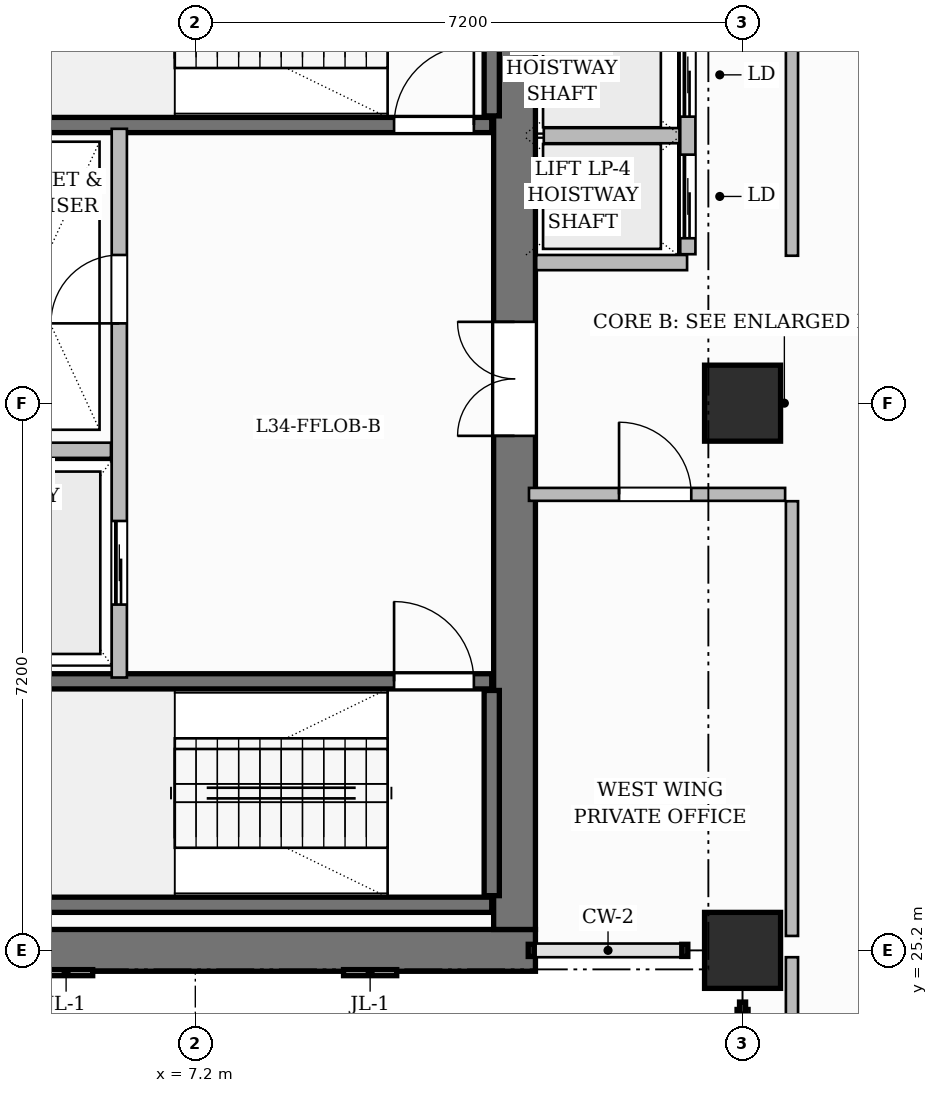
"""IFC4 building model, lengths in metres.
Left out: names, types, materials, properties, quantities, classifications, styles, units other than length and angle.
Written with IfcOpenShell. Run it as: python <this file> out.ifc"""

import sys

from ifc_helpers import new_model, si_unit, direction, frame, frame_2d, origin, origin_2d, place, context, subcontext, project, spatial, rectangle, extrude, source, transform, mapped, element, fill, save


model = new_model("IFC4")
c1 = context("Model", 3, precision=1e-05, world=origin(), true_north=direction((0.0, 1.0)))
c2 = subcontext(c1, "Body", "Model", "MODEL_VIEW")
j1 = project(units=[si_unit("LENGTHUNIT", "METRE"), si_unit("PLANEANGLEUNIT", "RADIAN")], contexts=[c1])
p1 = place(None, origin())
s1 = spatial("IfcSite", under=j1, at=p1, CompositionType="ELEMENT")
p2 = place(p1, origin())
s2 = spatial("IfcBuilding", under=s1, at=p2, CompositionType="ELEMENT")
p3 = place(p2, frame((0.0, 0.0, 137.7)))
s3 = spatial("IfcBuildingStorey", under=s2, at=p3, CompositionType="ELEMENT", Elevation=137.7)
p4 = place(p3, frame((3.325, 25.2, 0.0), z_axis=(0.0, 0.0, 1.0), x_axis=(1.0, 0.0, 0.0)))
e1 = element("IfcWall", 1, at=p4, inside=s3, PredefinedType="SHEAR", context=c2, shape_type="SweptSolid", body=[
    extrude(rectangle(XDim=8.35, YDim=0.55, at=frame_2d((4.175, 0.0))), origin(), (0.0, 0.0, 1.0), 3.7),
])
p5 = place(p3, frame((11.4, 25.475, 0.0), z_axis=(0.0, 0.0, 1.0), x_axis=(0.0, 1.0, 0.0)))
e2 = element("IfcWall", 2, at=p5, inside=s3, PredefinedType="SHEAR", context=c2, shape_type="SweptSolid", body=[
    extrude(rectangle(XDim=13.85, YDim=0.55, at=frame_2d((6.925, 0.0))), origin(), (0.0, 0.0, 1.0), 3.7),
])
p6 = place(p5, frame((6.495, 0.0, 0.0)))
e3 = element("IfcOpeningElement", 3, at=p6, cuts=e2, PredefinedType="OPENING", context=c2, shape_type="SweptSolid", body=[
    extrude(rectangle(XDim=1.5, YDim=2.2, at=frame_2d((0.75, 1.1))), frame((0.0, 0.285, 0.0), z_axis=(0.0, -1.0, 0.0), x_axis=(1.0, 0.0, 0.0)), (0.0, 0.0, 1.0), 0.57),
])
m1 = source(origin(), c2, "Body", "SweptSolid", [
    extrude(rectangle(XDim=1.0, YDim=1.0, at=origin_2d()), origin(), (0.0, 0.0, 1.0), 3.7),
])
for number, where, z_axis, x_axis in (
    (4, (14.4, 25.2, 0.0), (0.0, 0.0, 1.0), (1.0, 0.0, 0.0)),
    (5, (14.4, 32.4, 0.0), (0.0, 0.0, 1.0), (1.0, 0.0, 0.0)),
):
    element("IfcColumn", number, at=place(p3, frame(where, z_axis=z_axis, x_axis=x_axis)), inside=s3, PredefinedType="COLUMN", context=c2, shape_type="MappedRepresentation", body=[
        mapped(m1, transform((0.0, 0.0, 0.0), scale=1.0)),
    ])
p7 = place(p3, frame((4.0, 25.8, 0.0), z_axis=(0.0, 0.0, 1.0), x_axis=(1.0, 0.0, 0.0)))
e6 = element("IfcWall", 6, at=p7, inside=s3, PredefinedType="SHEAR", context=c2, shape_type="SweptSolid", body=[
    extrude(rectangle(XDim=7.1, YDim=0.2, at=frame_2d((3.55, 0.0))), origin(), (0.0, 0.0, 1.0), 3.7),
])
p8 = place(p3, frame((11.1, 25.92, 0.0), z_axis=(0.0, 0.0, 1.0), x_axis=(0.0, 1.0, 0.0)))
e7 = element("IfcWall", 7, at=p8, inside=s3, PredefinedType="SHEAR", context=c2, shape_type="SweptSolid", body=[
    extrude(rectangle(XDim=2.7, YDim=0.2, at=frame_2d((1.35, 0.0))), origin(), (0.0, 0.0, 1.0), 3.7),
])
p9 = place(p3, frame((4.0, 28.74, 0.0), z_axis=(0.0, 0.0, 1.0), x_axis=(1.0, 0.0, 0.0)))
e8 = element("IfcWall", 8, at=p9, inside=s3, PredefinedType="SHEAR", context=c2, shape_type="SweptSolid", body=[
    extrude(rectangle(XDim=7.1, YDim=0.2, at=frame_2d((3.55, 0.0))), origin(), (0.0, 0.0, 1.0), 3.7),
])
p10 = place(p9, frame((5.815, 0.0, 0.0)))
e9 = element("IfcOpeningElement", 9, at=p10, cuts=e8, PredefinedType="OPENING", context=c2, shape_type="SweptSolid", body=[
    extrude(rectangle(XDim=1.05, YDim=2.2, at=frame_2d((0.525, 1.1))), frame((0.0, 0.11, 0.0), z_axis=(0.0, -1.0, 0.0), x_axis=(1.0, 0.0, 0.0)), (0.0, 0.0, 1.0), 0.22),
])
p11 = place(p3, frame((11.1, 36.18, 0.0), z_axis=(0.0, 0.0, 1.0), x_axis=(0.0, 1.0, 0.0)))
e10 = element("IfcWall", 10, at=p11, inside=s3, PredefinedType="SHEAR", context=c2, shape_type="SweptSolid", body=[
    extrude(rectangle(XDim=2.7, YDim=0.2, at=frame_2d((1.35, 0.0))), origin(), (0.0, 0.0, 1.0), 3.7),
])
p12 = place(p3, frame((4.0, 36.06, 0.0), z_axis=(0.0, 0.0, 1.0), x_axis=(1.0, 0.0, 0.0)))
e11 = element("IfcWall", 11, at=p12, inside=s3, PredefinedType="SHEAR", context=c2, shape_type="SweptSolid", body=[
    extrude(rectangle(XDim=7.1, YDim=0.2, at=frame_2d((3.55, 0.0))), origin(), (0.0, 0.0, 1.0), 3.7),
])
p13 = place(p12, frame((5.815, 0.0, 0.0)))
e12 = element("IfcOpeningElement", 12, at=p13, cuts=e11, PredefinedType="OPENING", context=c2, shape_type="SweptSolid", body=[
    extrude(rectangle(XDim=1.05, YDim=2.2, at=frame_2d((0.525, 1.1))), frame((0.0, 0.11, 0.0), z_axis=(0.0, -1.0, 0.0), x_axis=(1.0, 0.0, 0.0)), (0.0, 0.0, 1.0), 0.22),
])
p14 = place(p3, frame((6.2, 28.79, 0.0), z_axis=(0.0, 0.0, 1.0), x_axis=(0.0, 1.0, 0.0)))
e13 = element("IfcWall", 13, at=p14, inside=s3, PredefinedType="PARTITIONING", context=c2, shape_type="SweptSolid", body=[
    extrude(rectangle(XDim=7.22, YDim=0.2, at=frame_2d((3.61, 0.0))), origin(), (0.0, 0.0, 1.0), 3.45),
])
p15 = place(p14, frame((4.66, 0.0, 0.0)))
e14 = element("IfcOpeningElement", 14, at=p15, cuts=e13, PredefinedType="OPENING", context=c2, shape_type="SweptSolid", body=[
    extrude(rectangle(XDim=0.9, YDim=2.1, at=frame_2d((0.45, 1.05))), frame((0.0, 0.11, 0.0), z_axis=(0.0, -1.0, 0.0), x_axis=(1.0, 0.0, 0.0)), (0.0, 0.0, 1.0), 0.22),
])
p16 = place(p14, frame((0.96, 0.0, 0.0)))
e15 = element("IfcOpeningElement", 15, at=p16, cuts=e13, PredefinedType="OPENING", context=c2, shape_type="SweptSolid", body=[
    extrude(rectangle(XDim=1.1, YDim=2.2, at=frame_2d((0.55, 1.1))), frame((0.0, 0.11, 0.0), z_axis=(0.0, -1.0, 0.0), x_axis=(1.0, 0.0, 0.0)), (0.0, 0.0, 1.0), 0.22),
])
p17 = place(p3, frame((3.96, 31.78, 0.0), z_axis=(0.0, 0.0, 1.0), x_axis=(1.0, 0.0, 0.0)))
e16 = element("IfcWall", 16, at=p17, inside=s3, PredefinedType="PARTITIONING", context=c2, shape_type="SweptSolid", body=[
    extrude(rectangle(XDim=2.13, YDim=0.2, at=frame_2d((1.065, 0.0))), origin(), (0.0, 0.0, 1.0), 3.45),
])
p18 = place(p3, frame((11.685, 34.25, 0.0), z_axis=(0.0, 0.0, 1.0), x_axis=(1.0, 0.0, 0.0)))
e17 = element("IfcWall", 17, at=p18, inside=s3, PredefinedType="PARTITIONING", context=c2, shape_type="SweptSolid", body=[
    extrude(rectangle(XDim=1.985, YDim=0.2, at=frame_2d((0.992, 0.0))), origin(), (0.0, 0.0, 1.0), 3.45),
])
p19 = place(p3, frame((13.68, 34.36, 0.0), z_axis=(0.0, 0.0, 1.0), x_axis=(0.0, 1.0, 0.0)))
e18 = element("IfcWall", 18, at=p19, inside=s3, PredefinedType="PARTITIONING", context=c2, shape_type="SweptSolid", body=[
    extrude(rectangle(XDim=4.72, YDim=0.2, at=frame_2d((2.36, 0.0))), origin(), (0.0, 0.0, 1.0), 3.45),
])
p20 = place(p19, frame((0.21, 0.0, 0.0)))
e19 = element("IfcOpeningElement", 19, at=p20, cuts=e18, PredefinedType="OPENING", context=c2, shape_type="SweptSolid", body=[
    extrude(rectangle(XDim=1.1, YDim=2.2, at=frame_2d((0.55, 1.1))), frame((0.0, 0.11, 0.0), z_axis=(0.0, -1.0, 0.0), x_axis=(1.0, 0.0, 0.0)), (0.0, 0.0, 1.0), 0.22),
])
p21 = place(p19, frame((1.81, 0.0, 0.0)))
e20 = element("IfcOpeningElement", 20, at=p21, cuts=e18, PredefinedType="OPENING", context=c2, shape_type="SweptSolid", body=[
    extrude(rectangle(XDim=1.1, YDim=2.2, at=frame_2d((0.55, 1.1))), frame((0.0, 0.11, 0.0), z_axis=(0.0, -1.0, 0.0), x_axis=(1.0, 0.0, 0.0)), (0.0, 0.0, 1.0), 0.22),
])
p22 = place(p19, frame((3.41, 0.0, 0.0)))
e21 = element("IfcOpeningElement", 21, at=p22, cuts=e18, PredefinedType="OPENING", context=c2, shape_type="SweptSolid", body=[
    extrude(rectangle(XDim=1.1, YDim=2.2, at=frame_2d((0.55, 1.1))), frame((0.0, 0.11, 0.0), z_axis=(0.0, -1.0, 0.0), x_axis=(1.0, 0.0, 0.0)), (0.0, 0.0, 1.0), 0.22),
])
p23 = place(p3, frame((11.785, 35.92, 0.0), z_axis=(0.0, 0.0, 1.0), x_axis=(1.0, 0.0, 0.0)))
e22 = element("IfcWall", 22, at=p23, inside=s3, PredefinedType="PARTITIONING", context=c2, shape_type="SweptSolid", body=[
    extrude(rectangle(XDim=1.785, YDim=0.2, at=frame_2d((0.893, 0.0))), origin(), (0.0, 0.0, 1.0), 3.45),
])
p24 = place(p3, frame((15.05, 12.16, 0.0), z_axis=(0.0, 0.0, 1.0), x_axis=(0.0, 1.0, 0.0)))
e23 = element("IfcWall", 23, at=p24, inside=s3, PredefinedType="PARTITIONING", context=c2, shape_type="SweptSolid", body=[
    extrude(rectangle(XDim=12.95, YDim=0.16, at=frame_2d((6.475, 0.0))), origin(), (0.0, 0.0, 1.0), 3.45),
])
p25 = place(p3, frame((15.05, 34.34, 0.0), z_axis=(0.0, 0.0, 1.0), x_axis=(0.0, 1.0, 0.0)))
e24 = element("IfcWall", 24, at=p25, inside=s3, PredefinedType="PARTITIONING", context=c2, shape_type="SweptSolid", body=[
    extrude(rectangle(XDim=5.22, YDim=0.16, at=frame_2d((2.61, 0.0))), origin(), (0.0, 0.0, 1.0), 3.45),
])
p26 = place(p3, frame((15.05, 25.39, 0.0), z_axis=(0.0, 0.0, 1.0), x_axis=(0.0, 1.0, 0.0)))
e25 = element("IfcWall", 25, at=p26, inside=s3, PredefinedType="PARTITIONING", context=c2, shape_type="SweptSolid", body=[
    extrude(rectangle(XDim=5.72, YDim=0.16, at=frame_2d((2.86, 0.0))), origin(), (0.0, 0.0, 1.0), 3.45),
])
p27 = place(p3, frame((11.59, 31.2, 0.0), z_axis=(0.0, 0.0, 1.0), x_axis=(1.0, 0.0, 0.0)))
e26 = element("IfcWall", 26, at=p27, inside=s3, PredefinedType="PARTITIONING", context=c2, shape_type="SweptSolid", body=[
    extrude(rectangle(XDim=3.37, YDim=0.17, at=frame_2d((1.685, 0.0))), origin(), (0.0, 0.0, 1.0), 3.45),
])
p28 = place(p27, frame((1.185, 0.0, 0.0)))
e27 = element("IfcOpeningElement", 27, at=p28, cuts=e26, PredefinedType="OPENING", context=c2, shape_type="SweptSolid", body=[
    extrude(rectangle(XDim=0.95, YDim=2.15, at=frame_2d((0.475, 1.075))), frame((0.0, 0.095, 0.0), z_axis=(0.0, -1.0, 0.0), x_axis=(1.0, 0.0, 0.0)), (0.0, 0.0, 1.0), 0.19),
])
m2 = source(origin(), c2, "Body", "SweptSolid", [
    extrude(rectangle(XDim=1.05, YDim=2.2, at=frame_2d((0.525, 1.1))), frame((0.0, 0.025, 0.0), z_axis=(0.0, -1.0, 0.0), x_axis=(1.0, 0.0, 0.0)), (0.0, 0.0, 1.0), 0.05),
])
p29 = place(p10, origin())
e28 = element("IfcDoor", 28, at=p29, inside=s3, OperationType="SINGLE_SWING_LEFT", PredefinedType="DOOR", context=c2, shape_type="MappedRepresentation", body=[
    mapped(m2, transform((0.0, 0.0, 0.0), scale=1.0)),
])
fill(e9, e28)
p30 = place(p13, origin())
e29 = element("IfcDoor", 29, at=p30, inside=s3, OperationType="SINGLE_SWING_RIGHT", PredefinedType="DOOR", context=c2, shape_type="MappedRepresentation", body=[
    mapped(m2, transform((0.0, 0.0, 0.0), scale=1.0)),
])
fill(e12, e29)
m3 = source(origin(), c2, "Body", "SweptSolid", [
    extrude(rectangle(XDim=0.9, YDim=2.1, at=frame_2d((0.45, 1.05))), frame((0.0, 0.025, 0.0), z_axis=(0.0, -1.0, 0.0), x_axis=(1.0, 0.0, 0.0)), (0.0, 0.0, 1.0), 0.05),
])
p31 = place(p15, origin())
e30 = element("IfcDoor", 30, at=p31, inside=s3, OperationType="SINGLE_SWING_LEFT", PredefinedType="DOOR", context=c2, shape_type="MappedRepresentation", body=[
    mapped(m3, transform((0.0, 0.0, 0.0), scale=1.0)),
])
fill(e14, e30)
m4 = source(origin(), c2, "Body", "SweptSolid", [
    extrude(rectangle(XDim=1.5, YDim=2.2, at=frame_2d((0.75, 1.1))), frame((0.0, 0.025, 0.0), z_axis=(0.0, -1.0, 0.0), x_axis=(1.0, 0.0, 0.0)), (0.0, 0.0, 1.0), 0.05),
])
p32 = place(p6, origin())
e31 = element("IfcDoor", 31, at=p32, inside=s3, OperationType="DOUBLE_DOOR_SINGLE_SWING", PredefinedType="DOOR", context=c2, shape_type="MappedRepresentation", body=[
    mapped(m4, transform((0.0, 0.0, 0.0), scale=1.0)),
])
fill(e3, e31)
m5 = source(origin(), c2, "Body", "SweptSolid", [
    extrude(rectangle(XDim=0.95, YDim=2.15, at=frame_2d((0.475, 1.075))), frame((0.0, 0.025, 0.0), z_axis=(0.0, -1.0, 0.0), x_axis=(1.0, 0.0, 0.0)), (0.0, 0.0, 1.0), 0.05),
])
p33 = place(p28, origin())
e32 = element("IfcDoor", 32, at=p33, inside=s3, OperationType="SINGLE_SWING_LEFT", PredefinedType="DOOR", context=c2, shape_type="MappedRepresentation", body=[
    mapped(m5, transform((0.0, 0.0, 0.0), scale=1.0)),
])
fill(e27, e32)
m6 = source(origin(), c2, "Body", "SweptSolid", [
    extrude(rectangle(XDim=1.1, YDim=2.2, at=frame_2d((0.55, 1.1))), frame((0.0, 0.025, 0.0), z_axis=(0.0, -1.0, 0.0), x_axis=(1.0, 0.0, 0.0)), (0.0, 0.0, 1.0), 0.05),
])
p34 = place(p16, origin())
e33 = element("IfcDoor", 33, at=p34, inside=s3, OperationType="SLIDING_TO_LEFT", PredefinedType="DOOR", context=c2, shape_type="MappedRepresentation", body=[
    mapped(m6, transform((0.0, 0.0, 0.0), scale=1.0)),
])
fill(e15, e33)
p35 = place(p20, origin())
e34 = element("IfcDoor", 34, at=p35, inside=s3, OperationType="SLIDING_TO_LEFT", PredefinedType="DOOR", context=c2, shape_type="MappedRepresentation", body=[
    mapped(m6, transform((0.0, 0.0, 0.0), scale=1.0)),
])
fill(e19, e34)
p36 = place(p21, origin())
e35 = element("IfcDoor", 35, at=p36, inside=s3, OperationType="SLIDING_TO_LEFT", PredefinedType="DOOR", context=c2, shape_type="MappedRepresentation", body=[
    mapped(m6, transform((0.0, 0.0, 0.0), scale=1.0)),
])
fill(e20, e35)
save(model, sys.argv[1])
